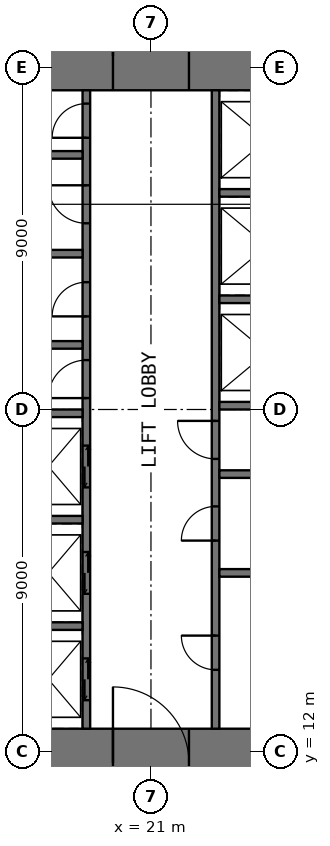
"""IFC4 building model, lengths in metres.
Left out: names, types, materials, properties, quantities, classifications, styles, units other than length and angle.
Written with IfcOpenShell. Run it as: python <this file> out.ifc"""

import sys

from ifc_helpers import new_model, si_unit, direction, frame, frame_2d, origin, place, context, subcontext, project, spatial, rectangle, extrude, element, fill, save


model = new_model("IFC4")
c1 = context("Model", 3, precision=1e-05, world=origin(), true_north=direction((0.0, 1.0)))
c2 = subcontext(c1, "Body", "Model", "MODEL_VIEW")
j1 = project(units=[si_unit("LENGTHUNIT", "METRE"), si_unit("PLANEANGLEUNIT", "RADIAN")], contexts=[c1])
p1 = place(None, origin())
s1 = spatial("IfcSite", under=j1, at=p1, CompositionType="ELEMENT")
p2 = place(p1, origin())
s2 = spatial("IfcBuilding", under=s1, at=p2, CompositionType="ELEMENT")
p3 = place(p2, frame((0.0, 0.0, 42.5)))
s3 = spatial("IfcBuildingStorey", under=s2, at=p3, CompositionType="ELEMENT", Elevation=42.5)
p4 = place(p3, frame((10.8, 11.7, -0.05), z_axis=(0.0, 0.0, 1.0), x_axis=(1.0, 0.0, 0.0)))
e1 = element("IfcWall", 1, at=p4, inside=s3, PredefinedType="SHEAR", context=c2, shape_type="SweptSolid", body=[
    extrude(rectangle(XDim=20.4, YDim=1.8, at=frame_2d((10.2, 0.0))), origin(), (0.0, 0.0, 1.0), 4.0),
])
p5 = place(p4, frame((9.2, 0.0, 0.05)))
e2 = element("IfcOpeningElement", 2, at=p5, cuts=e1, PredefinedType="OPENING", context=c2, shape_type="SweptSolid", body=[
    extrude(rectangle(XDim=2.0, YDim=2.2, at=frame_2d((1.0, 1.1))), frame((0.0, 0.91, 0.0), z_axis=(0.0, -1.0, 0.0), x_axis=(1.0, 0.0, 0.0)), (0.0, 0.0, 1.0), 1.82),
])
p6 = place(p3, frame((10.8, 30.3, -0.05), z_axis=(0.0, 0.0, 1.0), x_axis=(1.0, 0.0, 0.0)))
e3 = element("IfcWall", 3, at=p6, inside=s3, PredefinedType="SHEAR", context=c2, shape_type="SweptSolid", body=[
    extrude(rectangle(XDim=20.4, YDim=1.8, at=frame_2d((10.2, 0.0))), origin(), (0.0, 0.0, 1.0), 4.0),
])
p7 = place(p6, frame((9.2, 0.0, 0.05)))
e4 = element("IfcOpeningElement", 4, at=p7, cuts=e3, PredefinedType="OPENING", context=c2, shape_type="SweptSolid", body=[
    extrude(rectangle(XDim=2.0, YDim=2.2, at=frame_2d((1.0, 1.1))), frame((0.0, 0.91, 0.0), z_axis=(0.0, -1.0, 0.0), x_axis=(1.0, 0.0, 0.0)), (0.0, 0.0, 1.0), 1.82),
])
p8 = place(p3, frame((19.3, 12.6, -0.05), z_axis=(0.0, 0.0, 1.0), x_axis=(0.0, 1.0, 0.0)))
e5 = element("IfcWall", 5, at=p8, inside=s3, PredefinedType="SHEAR", context=c2, shape_type="SweptSolid", body=[
    extrude(rectangle(XDim=16.8, YDim=0.2, at=frame_2d((8.4, 0.0))), origin(), (0.0, 0.0, 1.0), 4.0),
])
p9 = place(p8, frame((8.7, 0.0, 0.05)))
e6 = element("IfcOpeningElement", 6, at=p9, cuts=e5, PredefinedType="OPENING", context=c2, shape_type="SweptSolid", body=[
    extrude(rectangle(XDim=1.0, YDim=2.2, at=frame_2d((0.5, 1.1))), frame((0.0, 0.11, 0.0), z_axis=(0.0, -1.0, 0.0), x_axis=(1.0, 0.0, 0.0)), (0.0, 0.0, 1.0), 0.22),
])
p10 = place(p8, frame((10.85, 0.0, 0.05)))
e7 = element("IfcOpeningElement", 7, at=p10, cuts=e5, PredefinedType="OPENING", context=c2, shape_type="SweptSolid", body=[
    extrude(rectangle(XDim=0.9, YDim=2.2, at=frame_2d((0.45, 1.1))), frame((0.0, 0.11, 0.0), z_axis=(0.0, -1.0, 0.0), x_axis=(1.0, 0.0, 0.0)), (0.0, 0.0, 1.0), 0.22),
])
p11 = place(p8, frame((13.3, 0.0, 0.05)))
e8 = element("IfcOpeningElement", 8, at=p11, cuts=e5, PredefinedType="OPENING", context=c2, shape_type="SweptSolid", body=[
    extrude(rectangle(XDim=1.0, YDim=2.2, at=frame_2d((0.5, 1.1))), frame((0.0, 0.11, 0.0), z_axis=(0.0, -1.0, 0.0), x_axis=(1.0, 0.0, 0.0)), (0.0, 0.0, 1.0), 0.22),
])
p12 = place(p8, frame((15.55, 0.0, 0.05)))
e9 = element("IfcOpeningElement", 9, at=p12, cuts=e5, PredefinedType="OPENING", context=c2, shape_type="SweptSolid", body=[
    extrude(rectangle(XDim=0.9, YDim=2.2, at=frame_2d((0.45, 1.1))), frame((0.0, 0.11, 0.0), z_axis=(0.0, -1.0, 0.0), x_axis=(1.0, 0.0, 0.0)), (0.0, 0.0, 1.0), 0.22),
])
p13 = place(p8, frame((0.75, 0.0, 0.05)))
e10 = element("IfcOpeningElement", 10, at=p13, cuts=e5, PredefinedType="OPENING", context=c2, shape_type="SweptSolid", body=[
    extrude(rectangle(XDim=1.1, YDim=2.2, at=frame_2d((0.55, 1.1))), frame((0.0, 0.11, 0.0), z_axis=(0.0, -1.0, 0.0), x_axis=(1.0, 0.0, 0.0)), (0.0, 0.0, 1.0), 0.22),
])
p14 = place(p8, frame((3.55, 0.0, 0.05)))
e11 = element("IfcOpeningElement", 11, at=p14, cuts=e5, PredefinedType="OPENING", context=c2, shape_type="SweptSolid", body=[
    extrude(rectangle(XDim=1.1, YDim=2.2, at=frame_2d((0.55, 1.1))), frame((0.0, 0.11, 0.0), z_axis=(0.0, -1.0, 0.0), x_axis=(1.0, 0.0, 0.0)), (0.0, 0.0, 1.0), 0.22),
])
p15 = place(p8, frame((6.35, 0.0, 0.05)))
e12 = element("IfcOpeningElement", 12, at=p15, cuts=e5, PredefinedType="OPENING", context=c2, shape_type="SweptSolid", body=[
    extrude(rectangle(XDim=1.1, YDim=2.2, at=frame_2d((0.55, 1.1))), frame((0.0, 0.11, 0.0), z_axis=(0.0, -1.0, 0.0), x_axis=(1.0, 0.0, 0.0)), (0.0, 0.0, 1.0), 0.22),
])
p16 = place(p3, frame((22.7, 12.6, -0.05), z_axis=(0.0, 0.0, 1.0), x_axis=(0.0, 1.0, 0.0)))
e13 = element("IfcWall", 13, at=p16, inside=s3, PredefinedType="SHEAR", context=c2, shape_type="SweptSolid", body=[
    extrude(rectangle(XDim=16.8, YDim=0.2, at=frame_2d((8.4, 0.0))), origin(), (0.0, 0.0, 1.0), 4.0),
])
p17 = place(p16, frame((7.1, 0.0, 0.05)))
e14 = element("IfcOpeningElement", 14, at=p17, cuts=e13, PredefinedType="OPENING", context=c2, shape_type="SweptSolid", body=[
    extrude(rectangle(XDim=1.0, YDim=2.2, at=frame_2d((0.5, 1.1))), frame((0.0, 0.11, 0.0), z_axis=(0.0, -1.0, 0.0), x_axis=(1.0, 0.0, 0.0)), (0.0, 0.0, 1.0), 0.22),
])
p18 = place(p16, frame((1.55, 0.0, 0.05)))
e15 = element("IfcOpeningElement", 15, at=p18, cuts=e13, PredefinedType="OPENING", context=c2, shape_type="SweptSolid", body=[
    extrude(rectangle(XDim=0.9, YDim=2.2, at=frame_2d((0.45, 1.1))), frame((0.0, 0.11, 0.0), z_axis=(0.0, -1.0, 0.0), x_axis=(1.0, 0.0, 0.0)), (0.0, 0.0, 1.0), 0.22),
])
p19 = place(p16, frame((4.95, 0.0, 0.05)))
e16 = element("IfcOpeningElement", 16, at=p19, cuts=e13, PredefinedType="OPENING", context=c2, shape_type="SweptSolid", body=[
    extrude(rectangle(XDim=0.9, YDim=2.2, at=frame_2d((0.45, 1.1))), frame((0.0, 0.11, 0.0), z_axis=(0.0, -1.0, 0.0), x_axis=(1.0, 0.0, 0.0)), (0.0, 0.0, 1.0), 0.22),
])
for number, where, z_axis, x_axis in (
    (17, (16.0, 15.3, -0.05), (0.0, 0.0, 1.0), (1.0, 0.0, 0.0)),
    (18, (16.0, 18.1, -0.05), (0.0, 0.0, 1.0), (1.0, 0.0, 0.0)),
    (19, (16.0, 20.9, -0.05), (0.0, 0.0, 1.0), (1.0, 0.0, 0.0)),
    (20, (16.0, 22.7, -0.05), (0.0, 0.0, 1.0), (1.0, 0.0, 0.0)),
    (21, (16.0, 25.1, -0.05), (0.0, 0.0, 1.0), (1.0, 0.0, 0.0)),
    (22, (16.0, 27.7, -0.05), (0.0, 0.0, 1.0), (1.0, 0.0, 0.0)),
    (23, (22.8, 16.7, -0.05), (0.0, 0.0, 1.0), (1.0, 0.0, 0.0)),
    (24, (22.8, 19.3, -0.05), (0.0, 0.0, 1.0), (1.0, 0.0, 0.0)),
    (25, (22.8, 21.1, -0.05), (0.0, 0.0, 1.0), (1.0, 0.0, 0.0)),
    (26, (22.8, 23.9, -0.05), (0.0, 0.0, 1.0), (1.0, 0.0, 0.0)),
    (27, (22.8, 26.7, -0.05), (0.0, 0.0, 1.0), (1.0, 0.0, 0.0)),
):
    element("IfcWall", number, at=place(p3, frame(where, z_axis=z_axis, x_axis=x_axis)), inside=s3, PredefinedType="SHEAR", context=c2, shape_type="SweptSolid", body=[
        extrude(rectangle(XDim=3.2, YDim=0.2, at=frame_2d((1.6, 0.0))), origin(), (0.0, 0.0, 1.0), 4.0),
    ])
p20 = place(p5, origin())
e28 = element("IfcDoor", 28, at=p20, inside=s3, OperationType="DOUBLE_DOOR_SINGLE_SWING", PredefinedType="DOOR", context=c2, shape_type="SweptSolid", body=[
    extrude(rectangle(XDim=2.0, YDim=2.2, at=frame_2d((1.0, 1.1))), frame((0.0, 0.025, 0.0), z_axis=(0.0, -1.0, 0.0), x_axis=(1.0, 0.0, 0.0)), (0.0, 0.0, 1.0), 0.05),
])
fill(e2, e28)
p21 = place(p7, origin())
e29 = element("IfcDoor", 29, at=p21, inside=s3, OperationType="DOUBLE_DOOR_SINGLE_SWING", PredefinedType="DOOR", context=c2, shape_type="SweptSolid", body=[
    extrude(rectangle(XDim=2.0, YDim=2.2, at=frame_2d((1.0, 1.1))), frame((0.0, 0.025, 0.0), z_axis=(0.0, -1.0, 0.0), x_axis=(1.0, 0.0, 0.0)), (0.0, 0.0, 1.0), 0.05),
])
fill(e4, e29)
p22 = place(p9, origin())
e30 = element("IfcDoor", 30, at=p22, inside=s3, OperationType="SINGLE_SWING_LEFT", PredefinedType="DOOR", context=c2, shape_type="SweptSolid", body=[
    extrude(rectangle(XDim=1.0, YDim=2.2, at=frame_2d((0.5, 1.1))), frame((0.0, 0.025, 0.0), z_axis=(0.0, -1.0, 0.0), x_axis=(1.0, 0.0, 0.0)), (0.0, 0.0, 1.0), 0.05),
])
fill(e6, e30)
p23 = place(p17, origin())
e31 = element("IfcDoor", 31, at=p23, inside=s3, OperationType="SINGLE_SWING_RIGHT", PredefinedType="DOOR", context=c2, shape_type="SweptSolid", body=[
    extrude(rectangle(XDim=1.0, YDim=2.2, at=frame_2d((0.5, 1.1))), frame((0.0, 0.025, 0.0), z_axis=(0.0, -1.0, 0.0), x_axis=(1.0, 0.0, 0.0)), (0.0, 0.0, 1.0), 0.05),
])
fill(e14, e31)
p24 = place(p10, origin())
e32 = element("IfcDoor", 32, at=p24, inside=s3, OperationType="SINGLE_SWING_LEFT", PredefinedType="DOOR", context=c2, shape_type="SweptSolid", body=[
    extrude(rectangle(XDim=0.9, YDim=2.2, at=frame_2d((0.45, 1.1))), frame((0.0, 0.025, 0.0), z_axis=(0.0, -1.0, 0.0), x_axis=(1.0, 0.0, 0.0)), (0.0, 0.0, 1.0), 0.05),
])
fill(e7, e32)
p25 = place(p11, origin())
e33 = element("IfcDoor", 33, at=p25, inside=s3, OperationType="SINGLE_SWING_RIGHT", PredefinedType="DOOR", context=c2, shape_type="SweptSolid", body=[
    extrude(rectangle(XDim=1.0, YDim=2.2, at=frame_2d((0.5, 1.1))), frame((0.0, 0.025, 0.0), z_axis=(0.0, -1.0, 0.0), x_axis=(1.0, 0.0, 0.0)), (0.0, 0.0, 1.0), 0.05),
])
fill(e8, e33)
p26 = place(p12, origin())
e34 = element("IfcDoor", 34, at=p26, inside=s3, OperationType="SINGLE_SWING_LEFT", PredefinedType="DOOR", context=c2, shape_type="SweptSolid", body=[
    extrude(rectangle(XDim=0.9, YDim=2.2, at=frame_2d((0.45, 1.1))), frame((0.0, 0.025, 0.0), z_axis=(0.0, -1.0, 0.0), x_axis=(1.0, 0.0, 0.0)), (0.0, 0.0, 1.0), 0.05),
])
fill(e9, e34)
p27 = place(p18, origin())
e35 = element("IfcDoor", 35, at=p27, inside=s3, OperationType="SINGLE_SWING_RIGHT", PredefinedType="DOOR", context=c2, shape_type="SweptSolid", body=[
    extrude(rectangle(XDim=0.9, YDim=2.2, at=frame_2d((0.45, 1.1))), frame((0.0, 0.025, 0.0), z_axis=(0.0, -1.0, 0.0), x_axis=(1.0, 0.0, 0.0)), (0.0, 0.0, 1.0), 0.05),
])
fill(e15, e35)
p28 = place(p19, origin())
e36 = element("IfcDoor", 36, at=p28, inside=s3, OperationType="SINGLE_SWING_LEFT", PredefinedType="DOOR", context=c2, shape_type="SweptSolid", body=[
    extrude(rectangle(XDim=0.9, YDim=2.2, at=frame_2d((0.45, 1.1))), frame((0.0, 0.025, 0.0), z_axis=(0.0, -1.0, 0.0), x_axis=(1.0, 0.0, 0.0)), (0.0, 0.0, 1.0), 0.05),
])
fill(e16, e36)
p29 = place(p13, origin())
e37 = element("IfcDoor", 37, at=p29, inside=s3, OperationType="DOUBLE_DOOR_SLIDING", PredefinedType="DOOR", context=c2, shape_type="SweptSolid", body=[
    extrude(rectangle(XDim=1.1, YDim=2.2, at=frame_2d((0.55, 1.1))), frame((0.0, 0.025, 0.0), z_axis=(0.0, -1.0, 0.0), x_axis=(1.0, 0.0, 0.0)), (0.0, 0.0, 1.0), 0.05),
])
fill(e10, e37)
p30 = place(p14, origin())
e38 = element("IfcDoor", 38, at=p30, inside=s3, OperationType="DOUBLE_DOOR_SLIDING", PredefinedType="DOOR", context=c2, shape_type="SweptSolid", body=[
    extrude(rectangle(XDim=1.1, YDim=2.2, at=frame_2d((0.55, 1.1))), frame((0.0, 0.025, 0.0), z_axis=(0.0, -1.0, 0.0), x_axis=(1.0, 0.0, 0.0)), (0.0, 0.0, 1.0), 0.05),
])
fill(e11, e38)
p31 = place(p15, origin())
e39 = element("IfcDoor", 39, at=p31, inside=s3, OperationType="DOUBLE_DOOR_SLIDING", PredefinedType="DOOR", context=c2, shape_type="SweptSolid", body=[
    extrude(rectangle(XDim=1.1, YDim=2.2, at=frame_2d((0.55, 1.1))), frame((0.0, 0.025, 0.0), z_axis=(0.0, -1.0, 0.0), x_axis=(1.0, 0.0, 0.0)), (0.0, 0.0, 1.0), 0.05),
])
fill(e12, e39)
save(model, sys.argv[1])
